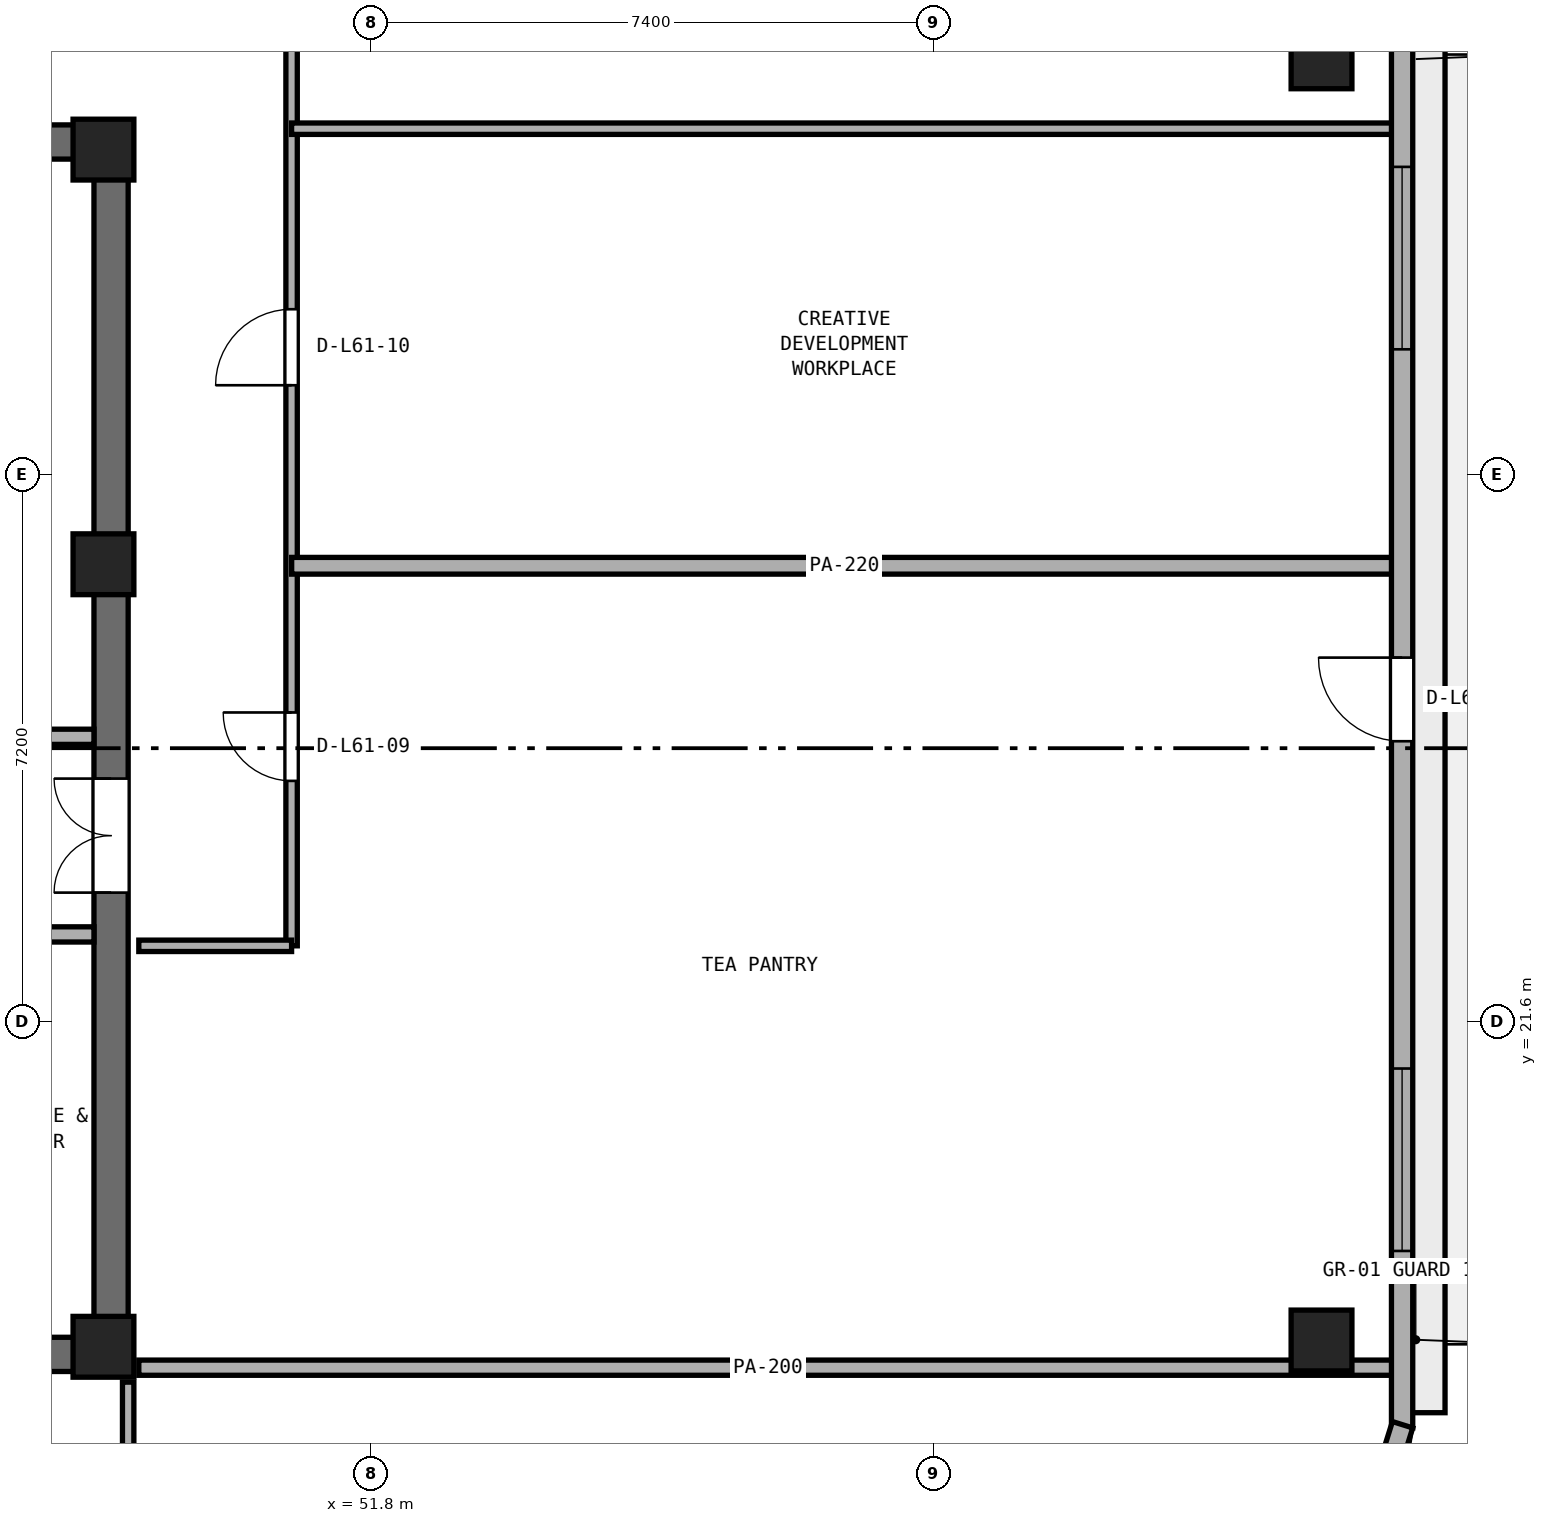
"""IFC4 building model, lengths in metres.
Left out: names, types, materials, properties, quantities, classifications, styles, units other than length and angle.
Written with IfcOpenShell. Run it as: python <this file> out.ifc"""

import sys

from ifc_helpers import new_model, si_unit, direction, frame, frame_2d, origin, origin_2d, place, context, subcontext, project, spatial, rectangle, extrude, element, fill, save


model = new_model("IFC4")
c1 = context("Model", 3, precision=1e-05, world=origin(), true_north=direction((0.0, 1.0)))
c2 = subcontext(c1, "Body", "Model", "MODEL_VIEW")
j1 = project(units=[si_unit("LENGTHUNIT", "METRE"), si_unit("PLANEANGLEUNIT", "RADIAN")], contexts=[c1])
p1 = place(None, origin())
s1 = spatial("IfcSite", under=j1, at=p1, CompositionType="ELEMENT")
p2 = place(p1, origin())
s2 = spatial("IfcBuilding", under=s1, at=p2, CompositionType="ELEMENT")
p3 = place(p2, frame((0.0, 0.0, 240.2)))
s3 = spatial("IfcBuildingStorey", under=s2, at=p3, CompositionType="ELEMENT", Elevation=240.2)
for number, where, z_axis, x_axis in (
    (1, (25.4, 17.225, 0.0), (0.0, 0.0, 1.0), (1.0, 0.0, 0.0)),
    (2, (25.4, 33.175, 0.0), (0.0, 0.0, 1.0), (1.0, 0.0, 0.0)),
):
    element("IfcWall", number, at=place(p3, frame(where, z_axis=z_axis, x_axis=x_axis)), inside=s3, PredefinedType="SHEAR", context=c2, shape_type="SweptSolid", body=[
        extrude(rectangle(XDim=23.2, YDim=0.45, at=frame_2d((11.6, 0.0))), origin(), (0.0, 0.0, 1.0), 3.51),
    ])
p4 = place(p3, frame((48.375, 17.45, 0.0), z_axis=(0.0, 0.0, 1.0), x_axis=(0.0, 1.0, 0.0)))
e3 = element("IfcWall", 3, at=p4, inside=s3, PredefinedType="SHEAR", context=c2, shape_type="SweptSolid", body=[
    extrude(rectangle(XDim=15.5, YDim=0.45, at=frame_2d((7.75, 0.0))), origin(), (0.0, 0.0, 1.0), 3.51),
])
p5 = place(p4, frame((5.85, 0.0, 0.0)))
e4 = element("IfcOpeningElement", 4, at=p5, cuts=e3, PredefinedType="OPENING", context=c2, shape_type="SweptSolid", body=[
    extrude(rectangle(XDim=1.5, YDim=2.15, at=frame_2d((0.75, 1.075))), frame((0.0, 0.235, 0.0), z_axis=(0.0, -1.0, 0.0), x_axis=(1.0, 0.0, 0.0)), (0.0, 0.0, 1.0), 0.47),
])
for number, where, z_axis, x_axis in (
    (5, (48.275, 17.325, 0.0), (0.0, 0.0, 1.0), (1.0, 0.0, 0.0)),
    (6, (48.275, 27.62, 0.0), (0.0, 0.0, 1.0), (1.0, 0.0, 0.0)),
    (7, (48.275, 33.075, 0.0), (0.0, 0.0, 1.0), (1.0, 0.0, 0.0)),
):
    element("IfcColumn", number, at=place(p3, frame(where, z_axis=z_axis, x_axis=x_axis)), inside=s3, PredefinedType="PILASTER", context=c2, shape_type="SweptSolid", body=[
        extrude(rectangle(XDim=0.8, YDim=0.8, at=origin_2d()), origin(), (0.0, 0.0, 1.0), 3.8),
    ])
for number, where, z_axis, x_axis in (
    (8, (64.3, 17.408, 0.0), (0.0, 0.0, 1.0), (1.0, 0.0, 0.0)),
    (9, (64.3, 34.276, 0.0), (0.0, 0.0, 1.0), (1.0, 0.0, 0.0)),
):
    element("IfcColumn", number, at=place(p3, frame(where, z_axis=z_axis, x_axis=x_axis)), inside=s3, PredefinedType="COLUMN", context=c2, shape_type="SweptSolid", body=[
        extrude(rectangle(XDim=0.8, YDim=0.8, at=origin_2d()), origin(), (0.0, 0.0, 1.0), 3.8),
    ])
p6 = place(p3, frame((42.0, 22.75, 0.0), z_axis=(0.0, 0.0, 1.0), x_axis=(1.0, 0.0, 0.0)))
e10 = element("IfcWall", 10, at=p6, inside=s3, PredefinedType="SOLIDWALL", context=c2, shape_type="SweptSolid", body=[
    extrude(rectangle(XDim=6.15, YDim=0.2, at=frame_2d((3.075, 0.0))), origin(), (0.0, 0.0, 1.0), 3.51),
])
p7 = place(p3, frame((46.1, 25.35, 0.0), z_axis=(0.0, 0.0, 1.0), x_axis=(1.0, 0.0, 0.0)))
e11 = element("IfcWall", 11, at=p7, inside=s3, PredefinedType="SOLIDWALL", context=c2, shape_type="SweptSolid", body=[
    extrude(rectangle(XDim=2.05, YDim=0.2, at=frame_2d((1.025, 0.0))), origin(), (0.0, 0.0, 1.0), 3.51),
])
p8 = place(p3, frame((50.75, 22.6, 0.0), z_axis=(0.0, 0.0, 1.0), x_axis=(0.0, 1.0, 0.0)))
e12 = element("IfcWall", 12, at=p8, inside=s3, PredefinedType="PARTITIONING", context=c2, shape_type="SweptSolid", body=[
    extrude(rectangle(XDim=12.95, YDim=0.15, at=frame_2d((6.475, 0.0))), origin(), (0.0, 0.0, 1.0), 3.51),
])
p9 = place(p8, frame((2.17, 0.0, 0.0)))
e13 = element("IfcOpeningElement", 13, at=p9, cuts=e12, PredefinedType="OPENING", context=c2, shape_type="SweptSolid", body=[
    extrude(rectangle(XDim=0.9, YDim=2.1, at=frame_2d((0.45, 1.05))), frame((0.0, 0.085, 0.0), z_axis=(0.0, -1.0, 0.0), x_axis=(1.0, 0.0, 0.0)), (0.0, 0.0, 1.0), 0.17),
])
p10 = place(p8, frame((7.375, 0.0, 0.0)))
e14 = element("IfcOpeningElement", 14, at=p10, cuts=e12, PredefinedType="OPENING", context=c2, shape_type="SweptSolid", body=[
    extrude(rectangle(XDim=1.0, YDim=2.12, at=frame_2d((0.5, 1.06))), frame((0.0, 0.085, 0.0), z_axis=(0.0, -1.0, 0.0), x_axis=(1.0, 0.0, 0.0)), (0.0, 0.0, 1.0), 0.17),
])
p11 = place(p3, frame((48.6, 14.85, 0.0), z_axis=(0.0, 0.0, 1.0), x_axis=(0.0, 1.0, 0.0)))
e15 = element("IfcWall", 15, at=p11, inside=s3, PredefinedType="PARTITIONING", context=c2, shape_type="SweptSolid", body=[
    extrude(rectangle(XDim=2.01, YDim=0.15, at=frame_2d((1.005, 0.0))), origin(), (0.0, 0.0, 1.0), 2.893),
])
p12 = place(p3, frame((48.74, 17.05, 0.0), z_axis=(0.0, 0.0, 1.0), x_axis=(1.0, 0.0, 0.0)))
e16 = element("IfcWall", 16, at=p12, inside=s3, PredefinedType="PARTITIONING", context=c2, shape_type="SweptSolid", body=[
    extrude(rectangle(XDim=16.555, YDim=0.2, at=frame_2d((8.277, 0.0))), origin(), (0.0, 0.0, 1.0), 2.893),
])
p13 = place(p3, frame((48.74, 22.6, 0.0), z_axis=(0.0, 0.0, 1.0), x_axis=(1.0, 0.0, 0.0)))
e17 = element("IfcWall", 17, at=p13, inside=s3, PredefinedType="PARTITIONING", context=c2, shape_type="SweptSolid", body=[
    extrude(rectangle(XDim=2.01, YDim=0.15, at=frame_2d((1.005, 0.0))), origin(), (0.0, 0.0, 1.0), 3.51),
])
p14 = place(p3, frame((50.751, 27.6, 0.0), z_axis=(0.0, 0.0, 1.0), x_axis=(1.0, 0.0, 0.0)))
e18 = element("IfcWall", 18, at=p14, inside=s3, PredefinedType="PARTITIONING", context=c2, shape_type="SweptSolid", body=[
    extrude(rectangle(XDim=14.544, YDim=0.22, at=frame_2d((7.272, 0.0))), origin(), (0.0, 0.0, 1.0), 3.51),
])
p15 = place(p3, frame((50.75, 33.35, 0.0), z_axis=(0.0, 0.0, 1.0), x_axis=(1.0, 0.0, 0.0)))
e19 = element("IfcWall", 19, at=p15, inside=s3, PredefinedType="PARTITIONING", context=c2, shape_type="SweptSolid", body=[
    extrude(rectangle(XDim=14.545, YDim=0.15, at=frame_2d((7.272, 0.0))), origin(), (0.0, 0.0, 1.0), 2.893),
])
p16 = place(p3, frame((65.36, 16.258, 0.0), z_axis=(0.0, 0.0, 1.0), x_axis=(0.0, 1.0, 0.0)))
e20 = element("IfcWall", 20, at=p16, inside=s3, PredefinedType="STANDARD", context=c2, shape_type="SweptSolid", body=[
    extrude(rectangle(XDim=19.168, YDim=0.28, at=frame_2d((9.584, 0.0))), origin(), (0.0, 0.0, 1.0), 3.51),
])
p17 = place(p16, frame((9.034, 0.0, 0.0)))
e21 = element("IfcOpeningElement", 21, at=p17, cuts=e20, PredefinedType="OPENING", context=c2, shape_type="SweptSolid", body=[
    extrude(rectangle(XDim=1.1, YDim=2.2, at=frame_2d((0.55, 1.1))), frame((0.0, 0.15, 0.0), z_axis=(0.0, -1.0, 0.0), x_axis=(1.0, 0.0, 0.0)), (0.0, 0.0, 1.0), 0.3),
])
p18 = place(p16, frame((2.328, 0.0, 0.9)))
e22 = element("IfcOpeningElement", 22, at=p18, cuts=e20, PredefinedType="OPENING", context=c2, shape_type="SweptSolid", body=[
    extrude(rectangle(XDim=2.4, YDim=1.75, at=frame_2d((1.2, 0.875))), frame((0.0, 0.15, 0.0), z_axis=(0.0, -1.0, 0.0), x_axis=(1.0, 0.0, 0.0)), (0.0, 0.0, 1.0), 0.3),
])
p19 = place(p16, frame((14.19, 0.0, 0.9)))
e23 = element("IfcOpeningElement", 23, at=p19, cuts=e20, PredefinedType="OPENING", context=c2, shape_type="SweptSolid", body=[
    extrude(rectangle(XDim=2.4, YDim=1.75, at=frame_2d((1.2, 0.875))), frame((0.0, 0.15, 0.0), z_axis=(0.0, -1.0, 0.0), x_axis=(1.0, 0.0, 0.0)), (0.0, 0.0, 1.0), 0.3),
])
p20 = place(p3, frame((64.635, 13.962, 0.0), z_axis=(0.0, 0.0, 1.0), x_axis=(0.298649578722, 0.954362839348, 0.0)))
e24 = element("IfcWall", 24, at=p20, inside=s3, PredefinedType="STANDARD", context=c2, shape_type="SweptSolid", body=[
    extrude(rectangle(XDim=2.449, YDim=0.28, at=frame_2d((1.225, 0.0))), origin(), (0.0, 0.0, 1.0), 3.51),
])
p21 = place(p5, origin())
e25 = element("IfcDoor", 25, at=p21, inside=s3, OperationType="DOUBLE_DOOR_SINGLE_SWING", PredefinedType="DOOR", context=c2, shape_type="SweptSolid", body=[
    extrude(rectangle(XDim=1.5, YDim=2.15, at=frame_2d((0.75, 1.075))), frame((0.0, 0.025, 0.0), z_axis=(0.0, -1.0, 0.0), x_axis=(1.0, 0.0, 0.0)), (0.0, 0.0, 1.0), 0.05),
])
fill(e4, e25)
p22 = place(p9, origin())
e26 = element("IfcDoor", 26, at=p22, inside=s3, OperationType="SINGLE_SWING_RIGHT", PredefinedType="DOOR", context=c2, shape_type="SweptSolid", body=[
    extrude(rectangle(XDim=0.9, YDim=2.1, at=frame_2d((0.45, 1.05))), frame((0.0, 0.025, 0.0), z_axis=(0.0, -1.0, 0.0), x_axis=(1.0, 0.0, 0.0)), (0.0, 0.0, 1.0), 0.05),
])
fill(e13, e26)
p23 = place(p10, origin())
e27 = element("IfcDoor", 27, at=p23, inside=s3, OperationType="SINGLE_SWING_LEFT", PredefinedType="DOOR", context=c2, shape_type="SweptSolid", body=[
    extrude(rectangle(XDim=1.0, YDim=2.12, at=frame_2d((0.5, 1.06))), frame((0.0, 0.025, 0.0), z_axis=(0.0, -1.0, 0.0), x_axis=(1.0, 0.0, 0.0)), (0.0, 0.0, 1.0), 0.05),
])
fill(e14, e27)
p24 = place(p17, origin())
e28 = element("IfcDoor", 28, at=p24, inside=s3, OperationType="SINGLE_SWING_RIGHT", PredefinedType="DOOR", context=c2, shape_type="SweptSolid", body=[
    extrude(rectangle(XDim=1.1, YDim=2.2, at=frame_2d((0.55, 1.1))), frame((0.0, 0.025, 0.0), z_axis=(0.0, -1.0, 0.0), x_axis=(1.0, 0.0, 0.0)), (0.0, 0.0, 1.0), 0.05),
])
fill(e21, e28)
p25 = place(p18, origin())
e29 = element("IfcWindow", 29, at=p25, inside=s3, PartitioningType="SINGLE_PANEL", PredefinedType="WINDOW", context=c2, shape_type="SweptSolid", body=[
    extrude(rectangle(XDim=2.4, YDim=1.75, at=frame_2d((1.2, 0.875))), frame((0.0, 0.03, 0.0), z_axis=(0.0, -1.0, 0.0), x_axis=(1.0, 0.0, 0.0)), (0.0, 0.0, 1.0), 0.06),
])
fill(e22, e29)
p26 = place(p19, origin())
e30 = element("IfcWindow", 30, at=p26, inside=s3, PartitioningType="SINGLE_PANEL", PredefinedType="WINDOW", context=c2, shape_type="SweptSolid", body=[
    extrude(rectangle(XDim=2.4, YDim=1.75, at=frame_2d((1.2, 0.875))), frame((0.0, 0.03, 0.0), z_axis=(0.0, -1.0, 0.0), x_axis=(1.0, 0.0, 0.0)), (0.0, 0.0, 1.0), 0.06),
])
fill(e23, e30)
save(model, sys.argv[1])
